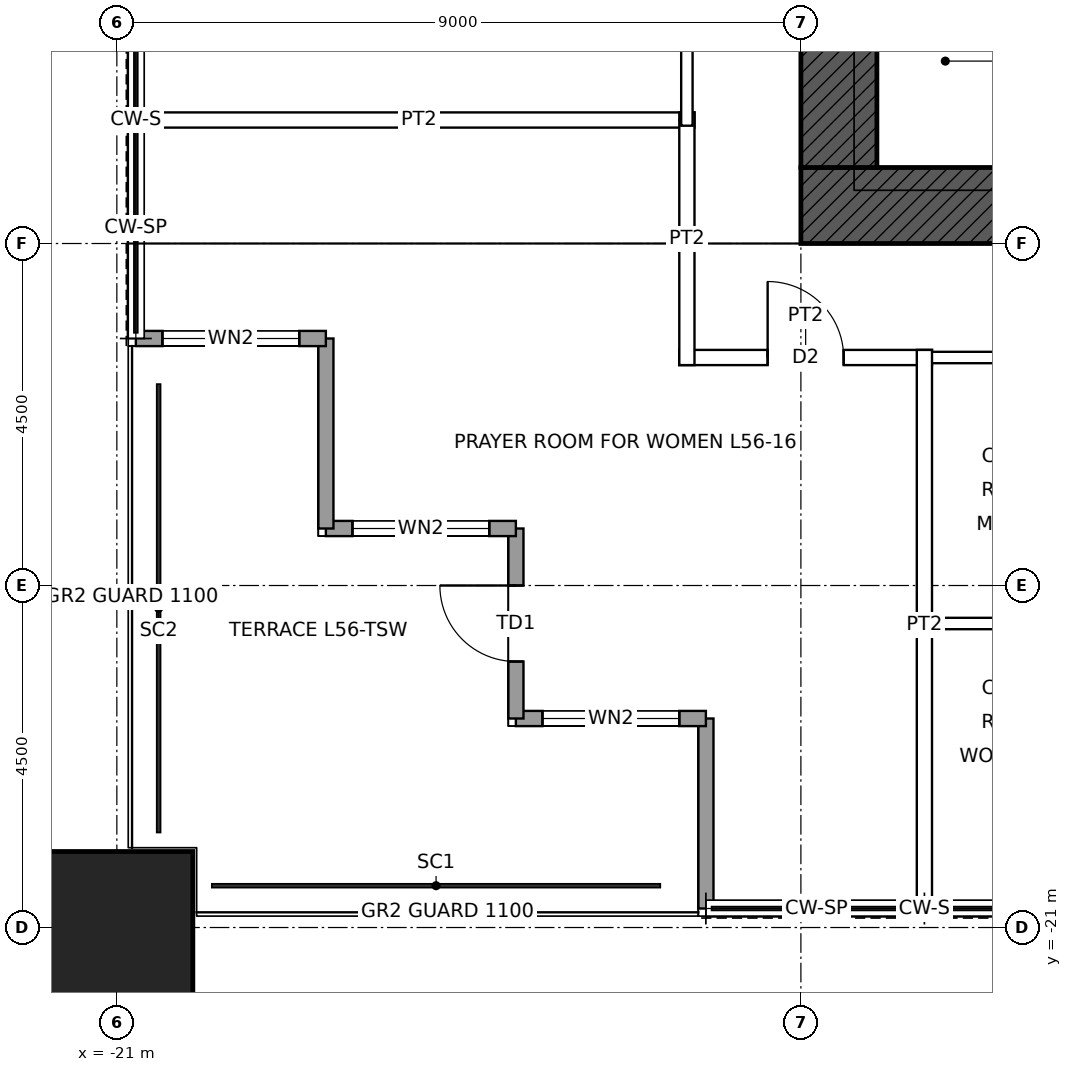
"""IFC4 building model, lengths in metres.
Left out: names, types, materials, properties, quantities, classifications, styles, units other than length and angle.
Written with IfcOpenShell. Run it as: python <this file> out.ifc"""

import sys

from ifc_helpers import new_model, si_unit, direction, frame, frame_2d, origin, origin_2d, place, context, subcontext, project, spatial, rectangle, hollow_rectangle, extrude, element, fill, save


model = new_model("IFC4")
c1 = context("Model", 3, precision=1e-05, world=origin(), true_north=direction((0.0, 1.0)))
c2 = subcontext(c1, "Body", "Model", "MODEL_VIEW")
j1 = project(units=[si_unit("LENGTHUNIT", "METRE"), si_unit("PLANEANGLEUNIT", "RADIAN")], contexts=[c1])
p1 = place(None, origin())
s1 = spatial("IfcSite", under=j1, at=p1, CompositionType="ELEMENT")
p2 = place(p1, origin())
s2 = spatial("IfcBuilding", under=s1, at=p2, CompositionType="ELEMENT")
p3 = place(p2, frame((0.0, 0.0, 259.9)))
s3 = spatial("IfcBuildingStorey", under=s2, at=p3, CompositionType="ELEMENT", Elevation=259.9)
p4 = place(p3, frame((-21.0, -21.0, 0.0), z_axis=(0.0, 0.0, 1.0), x_axis=(1.0, 0.0, 0.0)))
e1 = element("IfcColumn", 1, at=p4, inside=s3, PredefinedType="COLUMN", context=c2, shape_type="SweptSolid", body=[
    extrude(hollow_rectangle(XDim=2.0, YDim=2.0, WallThickness=0.095, at=origin_2d()), origin(), (0.0, 0.0, 1.0), 4.0),
])
p5 = place(p3, frame((12.0, -11.5, 0.0), z_axis=(0.0, 0.0, 1.0), x_axis=(-1.0, 0.0, 0.0)))
e2 = element("IfcWall", 2, at=p5, inside=s3, PredefinedType="SHEAR", context=c2, shape_type="SweptSolid", body=[
    extrude(rectangle(XDim=24.0, YDim=1.0, at=frame_2d((12.0, 0.0))), origin(), (0.0, 0.0, 1.0), 4.0),
])
p6 = place(p5, frame((11.5, 0.0, 0.0)))
e3 = element("IfcOpeningElement", 3, at=p6, cuts=e2, PredefinedType="OPENING", context=c2, shape_type="SweptSolid", body=[
    extrude(rectangle(XDim=1.0, YDim=2.1, at=frame_2d((0.5, 1.05))), frame((0.0, 0.51, 0.0), z_axis=(0.0, -1.0, 0.0), x_axis=(1.0, 0.0, 0.0)), (0.0, 0.0, 1.0), 1.02),
])
p7 = place(p5, frame((1.0, 0.0, 0.0)))
e4 = element("IfcOpeningElement", 4, at=p7, cuts=e2, PredefinedType="OPENING", context=c2, shape_type="SweptSolid", body=[
    extrude(rectangle(XDim=1.0, YDim=2.4, at=frame_2d((0.5, 1.2))), frame((0.0, 0.51, 0.0), z_axis=(0.0, -1.0, 0.0), x_axis=(1.0, 0.0, 0.0)), (0.0, 0.0, 1.0), 1.02),
])
p8 = place(p3, frame((-11.5, -11.0, 0.0), z_axis=(0.0, 0.0, 1.0), x_axis=(0.0, 1.0, 0.0)))
e5 = element("IfcWall", 5, at=p8, inside=s3, PredefinedType="SHEAR", context=c2, shape_type="SweptSolid", body=[
    extrude(rectangle(XDim=22.0, YDim=1.0, at=frame_2d((11.0, 0.0))), origin(), (0.0, 0.0, 1.0), 4.0),
])
p9 = place(p8, frame((10.5, 0.0, 0.0)))
e6 = element("IfcOpeningElement", 6, at=p9, cuts=e5, PredefinedType="OPENING", context=c2, shape_type="SweptSolid", body=[
    extrude(rectangle(XDim=1.0, YDim=2.4, at=frame_2d((0.5, 1.2))), frame((0.0, 0.51, 0.0), z_axis=(0.0, -1.0, 0.0), x_axis=(1.0, 0.0, 0.0)), (0.0, 0.0, 1.0), 1.02),
])
p10 = place(p3, frame((-13.25, -20.75, 0.0), z_axis=(0.0, 0.0, 1.0), x_axis=(0.0, 1.0, 0.0)))
e7 = element("IfcWall", 7, at=p10, inside=s3, PredefinedType="SOLIDWALL", context=c2, shape_type="SweptSolid", body=[
    extrude(rectangle(XDim=2.5, YDim=0.2, at=frame_2d((1.25, 0.0))), origin(), (0.0, 0.0, 1.0), 3.85),
])
p11 = place(p3, frame((-13.25, -18.25, 0.0), z_axis=(0.0, 0.0, 1.0), x_axis=(-1.0, 0.0, 0.0)))
e8 = element("IfcWall", 8, at=p11, inside=s3, PredefinedType="SOLIDWALL", context=c2, shape_type="SweptSolid", body=[
    extrude(rectangle(XDim=2.5, YDim=0.2, at=frame_2d((1.25, 0.0))), origin(), (0.0, 0.0, 1.0), 3.85),
])
p12 = place(p11, frame((0.35, 0.0, 0.3)))
e9 = element("IfcOpeningElement", 9, at=p12, cuts=e8, PredefinedType="OPENING", context=c2, shape_type="SweptSolid", body=[
    extrude(rectangle(XDim=1.8, YDim=2.4, at=frame_2d((0.9, 1.2))), frame((0.0, 0.11, 0.0), z_axis=(0.0, -1.0, 0.0), x_axis=(1.0, 0.0, 0.0)), (0.0, 0.0, 1.0), 0.22),
])
p13 = place(p3, frame((-15.75, -18.25, 0.0), z_axis=(0.0, 0.0, 1.0), x_axis=(0.0, 1.0, 0.0)))
e10 = element("IfcWall", 10, at=p13, inside=s3, PredefinedType="SOLIDWALL", context=c2, shape_type="SweptSolid", body=[
    extrude(rectangle(XDim=2.5, YDim=0.2, at=frame_2d((1.25, 0.0))), origin(), (0.0, 0.0, 1.0), 3.317),
])
p14 = place(p13, frame((0.75, 0.0, 0.0)))
e11 = element("IfcOpeningElement", 11, at=p14, cuts=e10, PredefinedType="OPENING", context=c2, shape_type="SweptSolid", body=[
    extrude(rectangle(XDim=1.0, YDim=2.4, at=frame_2d((0.5, 1.2))), frame((0.0, 0.11, 0.0), z_axis=(0.0, -1.0, 0.0), x_axis=(1.0, 0.0, 0.0)), (0.0, 0.0, 1.0), 0.22),
])
p15 = place(p3, frame((-15.75, -15.75, 0.0), z_axis=(0.0, 0.0, 1.0), x_axis=(-1.0, 0.0, 0.0)))
e12 = element("IfcWall", 12, at=p15, inside=s3, PredefinedType="SOLIDWALL", context=c2, shape_type="SweptSolid", body=[
    extrude(rectangle(XDim=2.5, YDim=0.2, at=frame_2d((1.25, 0.0))), origin(), (0.0, 0.0, 1.0), 3.85),
])
p16 = place(p15, frame((0.35, 0.0, 0.3)))
e13 = element("IfcOpeningElement", 13, at=p16, cuts=e12, PredefinedType="OPENING", context=c2, shape_type="SweptSolid", body=[
    extrude(rectangle(XDim=1.8, YDim=2.4, at=frame_2d((0.9, 1.2))), frame((0.0, 0.11, 0.0), z_axis=(0.0, -1.0, 0.0), x_axis=(1.0, 0.0, 0.0)), (0.0, 0.0, 1.0), 0.22),
])
p17 = place(p3, frame((-18.25, -15.75, 0.0), z_axis=(0.0, 0.0, 1.0), x_axis=(0.0, 1.0, 0.0)))
e14 = element("IfcWall", 14, at=p17, inside=s3, PredefinedType="SOLIDWALL", context=c2, shape_type="SweptSolid", body=[
    extrude(rectangle(XDim=2.5, YDim=0.2, at=frame_2d((1.25, 0.0))), origin(), (0.0, 0.0, 1.0), 3.85),
])
p18 = place(p3, frame((-18.25, -13.25, 0.0), z_axis=(0.0, 0.0, 1.0), x_axis=(-1.0, 0.0, 0.0)))
e15 = element("IfcWall", 15, at=p18, inside=s3, PredefinedType="SOLIDWALL", context=c2, shape_type="SweptSolid", body=[
    extrude(rectangle(XDim=2.5, YDim=0.2, at=frame_2d((1.25, 0.0))), origin(), (0.0, 0.0, 1.0), 3.85),
])
p19 = place(p18, frame((0.35, 0.0, 0.3)))
e16 = element("IfcOpeningElement", 16, at=p19, cuts=e15, PredefinedType="OPENING", context=c2, shape_type="SweptSolid", body=[
    extrude(rectangle(XDim=1.8, YDim=2.4, at=frame_2d((0.9, 1.2))), frame((0.0, 0.11, 0.0), z_axis=(0.0, -1.0, 0.0), x_axis=(1.0, 0.0, 0.0)), (0.0, 0.0, 1.0), 0.22),
])
p20 = place(p3, frame((-10.45, -17.0, 0.0), z_axis=(0.0, 0.0, 1.0), x_axis=(1.0, 0.0, 0.0)))
e17 = element("IfcWall", 17, at=p20, inside=s3, PredefinedType="PARTITIONING", context=c2, shape_type="SweptSolid", body=[
    extrude(rectangle(XDim=3.025, YDim=0.15, at=frame_2d((1.512, 0.0))), origin(), (0.0, 0.0, 1.0), 3.85),
])
p21 = place(p3, frame((-13.6, -13.5, 0.0), z_axis=(0.0, 0.0, 1.0), x_axis=(1.0, 0.0, 0.0)))
e18 = element("IfcWall", 18, at=p21, inside=s3, PredefinedType="PARTITIONING", context=c2, shape_type="SweptSolid", body=[
    extrude(rectangle(XDim=3.325, YDim=0.2, at=frame_2d((1.663, 0.0))), origin(), (0.0, 0.0, 1.0), 3.85),
])
p22 = place(p21, frame((1.163, 0.0, 0.0)))
e19 = element("IfcOpeningElement", 19, at=p22, cuts=e18, PredefinedType="OPENING", context=c2, shape_type="SweptSolid", body=[
    extrude(rectangle(XDim=1.0, YDim=2.1, at=frame_2d((0.5, 1.05))), frame((0.0, 0.11, 0.0), z_axis=(0.0, -1.0, 0.0), x_axis=(1.0, 0.0, 0.0)), (0.0, 0.0, 1.0), 0.22),
])
p23 = place(p3, frame((-10.45, -13.5, 0.0), z_axis=(0.0, 0.0, 1.0), x_axis=(1.0, 0.0, 0.0)))
e20 = element("IfcWall", 20, at=p23, inside=s3, PredefinedType="PARTITIONING", context=c2, shape_type="SweptSolid", body=[
    extrude(rectangle(XDim=13.025, YDim=0.15, at=frame_2d((6.512, 0.0))), origin(), (0.0, 0.0, 1.0), 3.85),
])
p24 = place(p23, frame((7.45, 0.0, 0.0)))
e21 = element("IfcOpeningElement", 21, at=p24, cuts=e20, PredefinedType="OPENING", context=c2, shape_type="SweptSolid", body=[
    extrude(rectangle(XDim=1.0, YDim=2.4, at=frame_2d((0.5, 1.2))), frame((0.0, 0.085, 0.0), z_axis=(0.0, -1.0, 0.0), x_axis=(1.0, 0.0, 0.0)), (0.0, 0.0, 1.0), 0.17),
])
p25 = place(p3, frame((-20.65, -10.375, 0.0), z_axis=(0.0, 0.0, 1.0), x_axis=(1.0, 0.0, 0.0)))
e22 = element("IfcWall", 22, at=p25, inside=s3, PredefinedType="PARTITIONING", context=c2, shape_type="SweptSolid", body=[
    extrude(rectangle(XDim=7.25, YDim=0.2, at=frame_2d((3.625, 0.0))), origin(), (0.0, 0.0, 1.0), 3.85),
])
p26 = place(p3, frame((-13.5, -13.6, 0.0), z_axis=(0.0, 0.0, 1.0), x_axis=(0.0, 1.0, 0.0)))
e23 = element("IfcWall", 23, at=p26, inside=s3, PredefinedType="PARTITIONING", context=c2, shape_type="SweptSolid", body=[
    extrude(rectangle(XDim=3.325, YDim=0.2, at=frame_2d((1.663, 0.0))), origin(), (0.0, 0.0, 1.0), 3.85),
])
p27 = place(p3, frame((-13.5, -10.45, 0.0), z_axis=(0.0, 0.0, 1.0), x_axis=(0.0, 1.0, 0.0)))
e24 = element("IfcWall", 24, at=p27, inside=s3, PredefinedType="PARTITIONING", context=c2, shape_type="SweptSolid", body=[
    extrude(rectangle(XDim=5.525, YDim=0.15, at=frame_2d((2.762, 0.0))), origin(), (0.0, 0.0, 1.0), 3.85),
])
p28 = place(p27, frame((1.012, 0.0, 0.0)))
e25 = element("IfcOpeningElement", 25, at=p28, cuts=e24, PredefinedType="OPENING", context=c2, shape_type="SweptSolid", body=[
    extrude(rectangle(XDim=1.0, YDim=2.1, at=frame_2d((0.5, 1.05))), frame((0.0, 0.085, 0.0), z_axis=(0.0, -1.0, 0.0), x_axis=(1.0, 0.0, 0.0)), (0.0, 0.0, 1.0), 0.17),
])
p29 = place(p27, frame((3.7, 0.0, 0.0)))
e26 = element("IfcOpeningElement", 26, at=p29, cuts=e24, PredefinedType="OPENING", context=c2, shape_type="SweptSolid", body=[
    extrude(rectangle(XDim=1.0, YDim=2.1, at=frame_2d((0.5, 1.05))), frame((0.0, 0.085, 0.0), z_axis=(0.0, -1.0, 0.0), x_axis=(1.0, 0.0, 0.0)), (0.0, 0.0, 1.0), 0.17),
])
p30 = place(p3, frame((-10.375, -20.65, 0.0), z_axis=(0.0, 0.0, 1.0), x_axis=(0.0, 1.0, 0.0)))
e27 = element("IfcWall", 27, at=p30, inside=s3, PredefinedType="PARTITIONING", context=c2, shape_type="SweptSolid", body=[
    extrude(rectangle(XDim=7.25, YDim=0.2, at=frame_2d((3.625, 0.0))), origin(), (0.0, 0.0, 1.0), 3.85),
])
p31 = place(p12, origin())
e28 = element("IfcWindow", 28, at=p31, inside=s3, PartitioningType="SINGLE_PANEL", PredefinedType="WINDOW", context=c2, shape_type="SweptSolid", body=[
    extrude(rectangle(XDim=1.8, YDim=2.4, at=frame_2d((0.9, 1.2))), frame((0.0, 0.03, 0.0), z_axis=(0.0, -1.0, 0.0), x_axis=(1.0, 0.0, 0.0)), (0.0, 0.0, 1.0), 0.06),
])
fill(e9, e28)
p32 = place(p14, origin())
e29 = element("IfcDoor", 29, at=p32, inside=s3, OperationType="SINGLE_SWING_RIGHT", PredefinedType="DOOR", context=c2, shape_type="SweptSolid", body=[
    extrude(rectangle(XDim=1.0, YDim=2.4, at=frame_2d((0.5, 1.2))), frame((0.0, 0.025, 0.0), z_axis=(0.0, -1.0, 0.0), x_axis=(1.0, 0.0, 0.0)), (0.0, 0.0, 1.0), 0.05),
])
fill(e11, e29)
p33 = place(p16, origin())
e30 = element("IfcWindow", 30, at=p33, inside=s3, PartitioningType="SINGLE_PANEL", PredefinedType="WINDOW", context=c2, shape_type="SweptSolid", body=[
    extrude(rectangle(XDim=1.8, YDim=2.4, at=frame_2d((0.9, 1.2))), frame((0.0, 0.03, 0.0), z_axis=(0.0, -1.0, 0.0), x_axis=(1.0, 0.0, 0.0)), (0.0, 0.0, 1.0), 0.06),
])
fill(e13, e30)
p34 = place(p19, origin())
e31 = element("IfcWindow", 31, at=p34, inside=s3, PartitioningType="SINGLE_PANEL", PredefinedType="WINDOW", context=c2, shape_type="SweptSolid", body=[
    extrude(rectangle(XDim=1.8, YDim=2.4, at=frame_2d((0.9, 1.2))), frame((0.0, 0.03, 0.0), z_axis=(0.0, -1.0, 0.0), x_axis=(1.0, 0.0, 0.0)), (0.0, 0.0, 1.0), 0.06),
])
fill(e16, e31)
p35 = place(p22, origin())
e32 = element("IfcDoor", 32, at=p35, inside=s3, OperationType="SINGLE_SWING_LEFT", PredefinedType="DOOR", context=c2, shape_type="SweptSolid", body=[
    extrude(rectangle(XDim=1.0, YDim=2.1, at=frame_2d((0.5, 1.05))), frame((0.0, 0.025, 0.0), z_axis=(0.0, -1.0, 0.0), x_axis=(1.0, 0.0, 0.0)), (0.0, 0.0, 1.0), 0.05),
])
fill(e19, e32)
save(model, sys.argv[1])
